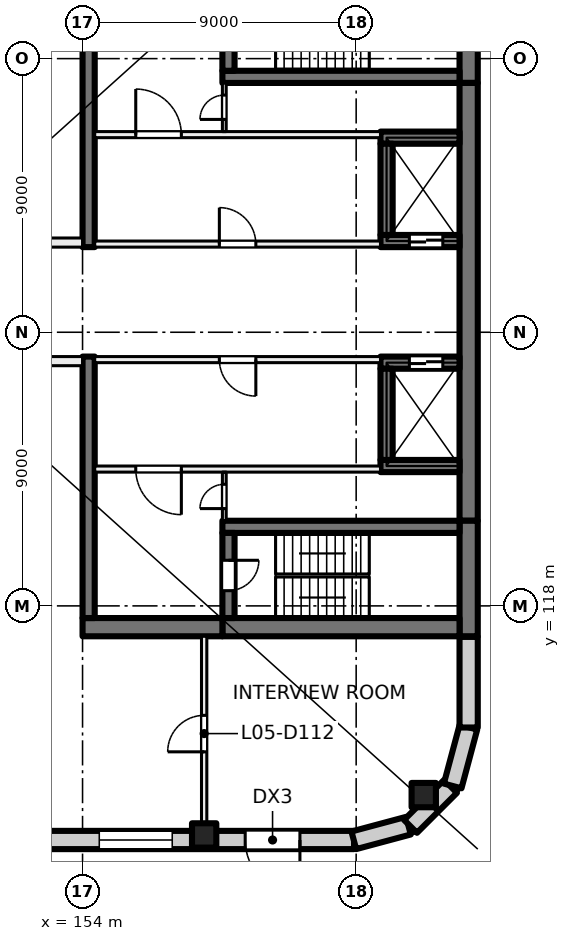
"""IFC4 building model, lengths in metres.
Left out: names, types, materials, properties, quantities, classifications, styles, units other than length and angle.
Written with IfcOpenShell. Run it as: python <this file> out.ifc"""

import sys

from ifc_helpers import new_model, si_unit, direction, frame, frame_2d, origin, origin_2d, place, context, subcontext, project, spatial, rectangle, extrude, element, fill, save


model = new_model("IFC4")
c1 = context("Model", 3, precision=1e-05, world=origin(), true_north=direction((0.0, 1.0)))
c2 = subcontext(c1, "Body", "Model", "MODEL_VIEW")
j1 = project(units=[si_unit("LENGTHUNIT", "METRE"), si_unit("PLANEANGLEUNIT", "RADIAN")], contexts=[c1])
p1 = place(None, origin())
s1 = spatial("IfcSite", under=j1, at=p1, CompositionType="ELEMENT")
p2 = place(p1, origin())
s2 = spatial("IfcBuilding", under=s1, at=p2, CompositionType="ELEMENT")
p3 = place(p2, frame((0.0, 0.0, 27.5)))
s3 = spatial("IfcBuildingStorey", under=s2, at=p3, CompositionType="ELEMENT", Elevation=27.5)
for number, where, z_axis, x_axis in (
    (1, (165.223, 111.777, 0.0), (0.0, 0.0, 1.0), (1.0, 0.0, 0.0)),
    (2, (158.0, 110.45, 0.0), (0.0, 0.0, 1.0), (1.0, 0.0, 0.0)),
):
    element("IfcColumn", number, at=place(p3, frame(where, z_axis=z_axis, x_axis=x_axis)), inside=s3, PredefinedType="COLUMN", context=c2, shape_type="SweptSolid", body=[
        extrude(rectangle(XDim=0.8, YDim=0.8, at=origin_2d()), origin(), (0.0, 0.0, 1.0), 4.0),
    ])
p4 = place(p3, frame((166.7, 139.0, 0.0), z_axis=(0.0, 0.0, 1.0), x_axis=(0.0, -1.0, 0.0)))
e3 = element("IfcWall", 3, at=p4, inside=s3, PredefinedType="SHEAR", context=c2, shape_type="SweptSolid", body=[
    extrude(rectangle(XDim=3.8, YDim=0.6, at=frame_2d((1.9, 0.0))), origin(), (0.0, 0.0, 1.0), 4.0),
])
p5 = place(p3, frame((166.7, 135.2, 0.0), z_axis=(0.0, 0.0, 1.0), x_axis=(0.0, -1.0, 0.0)))
e4 = element("IfcWall", 4, at=p5, inside=s3, PredefinedType="SHEAR", context=c2, shape_type="SweptSolid", body=[
    extrude(rectangle(XDim=14.4, YDim=0.6, at=frame_2d((7.2, 0.0))), origin(), (0.0, 0.0, 1.0), 4.0),
])
p6 = place(p3, frame((166.7, 120.8, 0.0), z_axis=(0.0, 0.0, 1.0), x_axis=(0.0, -1.0, 0.0)))
e5 = element("IfcWall", 5, at=p6, inside=s3, PredefinedType="SHEAR", context=c2, shape_type="SweptSolid", body=[
    extrude(rectangle(XDim=3.8, YDim=0.6, at=frame_2d((1.9, 0.0))), origin(), (0.0, 0.0, 1.0), 4.0),
])
p7 = place(p3, frame((166.4, 117.3, 0.0), z_axis=(0.0, 0.0, 1.0), x_axis=(-1.0, 0.0, 0.0)))
e6 = element("IfcWall", 6, at=p7, inside=s3, PredefinedType="SHEAR", context=c2, shape_type="SweptSolid", body=[
    extrude(rectangle(XDim=7.8, YDim=0.6, at=frame_2d((3.9, 0.0))), origin(), (0.0, 0.0, 1.0), 4.0),
])
p8 = place(p3, frame((158.6, 117.3, 0.0), z_axis=(0.0, 0.0, 1.0), x_axis=(-1.0, 0.0, 0.0)))
e7 = element("IfcWall", 7, at=p8, inside=s3, PredefinedType="SHEAR", context=c2, shape_type="SweptSolid", body=[
    extrude(rectangle(XDim=4.6, YDim=0.6, at=frame_2d((2.3, 0.0))), origin(), (0.0, 0.0, 1.0), 4.0),
])
p9 = place(p3, frame((166.4, 135.4, 0.0), z_axis=(0.0, 0.0, 1.0), x_axis=(-1.0, 0.0, 0.0)))
e8 = element("IfcWall", 8, at=p9, inside=s3, PredefinedType="SHEAR", context=c2, shape_type="SweptSolid", body=[
    extrude(rectangle(XDim=7.8, YDim=0.4, at=frame_2d((3.9, 0.0))), origin(), (0.0, 0.0, 1.0), 4.0),
])
p10 = place(p3, frame((158.8, 138.4, 0.0), z_axis=(0.0, 0.0, 1.0), x_axis=(0.0, -1.0, 0.0)))
e9 = element("IfcWall", 9, at=p10, inside=s3, PredefinedType="SHEAR", context=c2, shape_type="SweptSolid", body=[
    extrude(rectangle(XDim=2.8, YDim=0.4, at=frame_2d((1.4, 0.0))), origin(), (0.0, 0.0, 1.0), 4.0),
])
p11 = place(p10, frame((0.9, 0.0, 0.0)))
e10 = element("IfcOpeningElement", 10, at=p11, cuts=e9, PredefinedType="OPENING", context=c2, shape_type="SweptSolid", body=[
    extrude(rectangle(XDim=1.0, YDim=2.1, at=frame_2d((0.5, 1.05))), frame((0.0, 0.21, 0.0), z_axis=(0.0, -1.0, 0.0), x_axis=(1.0, 0.0, 0.0)), (0.0, 0.0, 1.0), 0.42),
])
p12 = place(p3, frame((166.4, 120.6, 0.0), z_axis=(0.0, 0.0, 1.0), x_axis=(-1.0, 0.0, 0.0)))
e11 = element("IfcWall", 11, at=p12, inside=s3, PredefinedType="SHEAR", context=c2, shape_type="SweptSolid", body=[
    extrude(rectangle(XDim=7.8, YDim=0.4, at=frame_2d((3.9, 0.0))), origin(), (0.0, 0.0, 1.0), 4.0),
])
p13 = place(p3, frame((158.8, 120.4, 0.0), z_axis=(0.0, 0.0, 1.0), x_axis=(0.0, -1.0, 0.0)))
e12 = element("IfcWall", 12, at=p13, inside=s3, PredefinedType="SHEAR", context=c2, shape_type="SweptSolid", body=[
    extrude(rectangle(XDim=2.8, YDim=0.4, at=frame_2d((1.4, 0.0))), origin(), (0.0, 0.0, 1.0), 4.0),
])
p14 = place(p13, frame((0.9, 0.0, 0.0)))
e13 = element("IfcOpeningElement", 13, at=p14, cuts=e12, PredefinedType="OPENING", context=c2, shape_type="SweptSolid", body=[
    extrude(rectangle(XDim=1.0, YDim=2.1, at=frame_2d((0.5, 1.05))), frame((0.0, 0.21, 0.0), z_axis=(0.0, -1.0, 0.0), x_axis=(1.0, 0.0, 0.0)), (0.0, 0.0, 1.0), 0.42),
])
p15 = place(p3, frame((166.4, 130.0, 0.0), z_axis=(0.0, 0.0, 1.0), x_axis=(-1.0, 0.0, 0.0)))
e14 = element("IfcWall", 14, at=p15, inside=s3, PredefinedType="SHEAR", context=c2, shape_type="SweptSolid", body=[
    extrude(rectangle(XDim=2.6, YDim=0.4, at=frame_2d((1.3, 0.0))), origin(), (0.0, 0.0, 1.0), 4.0),
])
p16 = place(p15, frame((0.55, 0.0, 0.0)))
e15 = element("IfcOpeningElement", 15, at=p16, cuts=e14, PredefinedType="OPENING", context=c2, shape_type="SweptSolid", body=[
    extrude(rectangle(XDim=1.1, YDim=2.1, at=frame_2d((0.55, 1.05))), frame((0.0, 0.21, 0.0), z_axis=(0.0, -1.0, 0.0), x_axis=(1.0, 0.0, 0.0)), (0.0, 0.0, 1.0), 0.42),
])
p17 = place(p3, frame((166.4, 133.4, 0.0), z_axis=(0.0, 0.0, 1.0), x_axis=(-1.0, 0.0, 0.0)))
e16 = element("IfcWall", 16, at=p17, inside=s3, PredefinedType="SHEAR", context=c2, shape_type="SweptSolid", body=[
    extrude(rectangle(XDim=2.6, YDim=0.4, at=frame_2d((1.3, 0.0))), origin(), (0.0, 0.0, 1.0), 4.0),
])
p18 = place(p3, frame((164.0, 133.2, 0.0), z_axis=(0.0, 0.0, 1.0), x_axis=(0.0, -1.0, 0.0)))
e17 = element("IfcWall", 17, at=p18, inside=s3, PredefinedType="SHEAR", context=c2, shape_type="SweptSolid", body=[
    extrude(rectangle(XDim=3.0, YDim=0.4, at=frame_2d((1.5, 0.0))), origin(), (0.0, 0.0, 1.0), 4.0),
])
p19 = place(p3, frame((166.4, 126.0, 0.0), z_axis=(0.0, 0.0, 1.0), x_axis=(-1.0, 0.0, 0.0)))
e18 = element("IfcWall", 18, at=p19, inside=s3, PredefinedType="SHEAR", context=c2, shape_type="SweptSolid", body=[
    extrude(rectangle(XDim=2.6, YDim=0.4, at=frame_2d((1.3, 0.0))), origin(), (0.0, 0.0, 1.0), 4.0),
])
p20 = place(p19, frame((0.55, 0.0, 0.0)))
e19 = element("IfcOpeningElement", 19, at=p20, cuts=e18, PredefinedType="OPENING", context=c2, shape_type="SweptSolid", body=[
    extrude(rectangle(XDim=1.1, YDim=2.1, at=frame_2d((0.55, 1.05))), frame((0.0, 0.21, 0.0), z_axis=(0.0, -1.0, 0.0), x_axis=(1.0, 0.0, 0.0)), (0.0, 0.0, 1.0), 0.42),
])
p21 = place(p3, frame((166.4, 122.6, 0.0), z_axis=(0.0, 0.0, 1.0), x_axis=(-1.0, 0.0, 0.0)))
e20 = element("IfcWall", 20, at=p21, inside=s3, PredefinedType="SHEAR", context=c2, shape_type="SweptSolid", body=[
    extrude(rectangle(XDim=2.6, YDim=0.4, at=frame_2d((1.3, 0.0))), origin(), (0.0, 0.0, 1.0), 4.0),
])
p22 = place(p3, frame((164.0, 125.8, 0.0), z_axis=(0.0, 0.0, 1.0), x_axis=(0.0, -1.0, 0.0)))
e21 = element("IfcWall", 21, at=p22, inside=s3, PredefinedType="SHEAR", context=c2, shape_type="SweptSolid", body=[
    extrude(rectangle(XDim=3.0, YDim=0.4, at=frame_2d((1.5, 0.0))), origin(), (0.0, 0.0, 1.0), 4.0),
])
for number, where, z_axis, x_axis in (
    (22, (154.2, 138.4, 0.0), (0.0, 0.0, 1.0), (0.0, -1.0, 0.0)),
    (23, (154.2, 126.2, 0.0), (0.0, 0.0, 1.0), (0.0, -1.0, 0.0)),
):
    element("IfcWall", number, at=place(p3, frame(where, z_axis=z_axis, x_axis=x_axis)), inside=s3, PredefinedType="SHEAR", context=c2, shape_type="SweptSolid", body=[
        extrude(rectangle(XDim=8.6, YDim=0.4, at=frame_2d((4.3, 0.0))), origin(), (0.0, 0.0, 1.0), 4.0),
    ])
p23 = place(p3, frame((162.93, 110.3, 0.0), z_axis=(0.0, 0.0, 1.0), x_axis=(-1.0, 0.0, 0.0)))
e24 = element("IfcWall", 24, at=p23, inside=s3, PredefinedType="SOLIDWALL", context=c2, shape_type="SweptSolid", body=[
    extrude(rectangle(XDim=31.93, YDim=0.6, at=frame_2d((15.965, 0.0))), origin(), (0.0, 0.0, 1.0), 3.625),
])
p24 = place(p23, frame((1.78, 0.0, 0.0)))
e25 = element("IfcOpeningElement", 25, at=p24, cuts=e24, PredefinedType="OPENING", context=c2, shape_type="SweptSolid", body=[
    extrude(rectangle(XDim=1.8, YDim=2.4, at=frame_2d((0.9, 1.2))), frame((0.0, 0.31, 0.0), z_axis=(0.0, -1.0, 0.0), x_axis=(1.0, 0.0, 0.0)), (0.0, 0.0, 1.0), 0.62),
])
p25 = place(p23, frame((5.98, 0.0, 0.9)))
e26 = element("IfcOpeningElement", 26, at=p25, cuts=e24, PredefinedType="OPENING", context=c2, shape_type="SweptSolid", body=[
    extrude(rectangle(XDim=2.4, YDim=2.4, at=frame_2d((1.2, 1.2))), frame((0.0, 0.31, 0.0), z_axis=(0.0, -1.0, 0.0), x_axis=(1.0, 0.0, 0.0)), (0.0, 0.0, 1.0), 0.62),
])
p26 = place(p23, frame((10.48, 0.0, 0.9)))
e27 = element("IfcOpeningElement", 27, at=p26, cuts=e24, PredefinedType="OPENING", context=c2, shape_type="SweptSolid", body=[
    extrude(rectangle(XDim=2.4, YDim=2.4, at=frame_2d((1.2, 1.2))), frame((0.0, 0.31, 0.0), z_axis=(0.0, -1.0, 0.0), x_axis=(1.0, 0.0, 0.0)), (0.0, 0.0, 1.0), 0.62),
])
p27 = place(p23, frame((14.98, 0.0, 0.9)))
e28 = element("IfcOpeningElement", 28, at=p27, cuts=e24, PredefinedType="OPENING", context=c2, shape_type="SweptSolid", body=[
    extrude(rectangle(XDim=2.4, YDim=2.4, at=frame_2d((1.2, 1.2))), frame((0.0, 0.31, 0.0), z_axis=(0.0, -1.0, 0.0), x_axis=(1.0, 0.0, 0.0)), (0.0, 0.0, 1.0), 0.62),
])
p28 = place(p23, frame((19.78, 0.0, 0.0)))
e29 = element("IfcOpeningElement", 29, at=p28, cuts=e24, PredefinedType="OPENING", context=c2, shape_type="SweptSolid", body=[
    extrude(rectangle(XDim=1.8, YDim=2.4, at=frame_2d((0.9, 1.2))), frame((0.0, 0.31, 0.0), z_axis=(0.0, -1.0, 0.0), x_axis=(1.0, 0.0, 0.0)), (0.0, 0.0, 1.0), 0.62),
])
p29 = place(p23, frame((23.98, 0.0, 0.9)))
e30 = element("IfcOpeningElement", 30, at=p29, cuts=e24, PredefinedType="OPENING", context=c2, shape_type="SweptSolid", body=[
    extrude(rectangle(XDim=2.4, YDim=2.4, at=frame_2d((1.2, 1.2))), frame((0.0, 0.31, 0.0), z_axis=(0.0, -1.0, 0.0), x_axis=(1.0, 0.0, 0.0)), (0.0, 0.0, 1.0), 0.62),
])
p30 = place(p23, frame((28.48, 0.0, 0.9)))
e31 = element("IfcOpeningElement", 31, at=p30, cuts=e24, PredefinedType="OPENING", context=c2, shape_type="SweptSolid", body=[
    extrude(rectangle(XDim=2.4, YDim=2.4, at=frame_2d((1.2, 1.2))), frame((0.0, 0.31, 0.0), z_axis=(0.0, -1.0, 0.0), x_axis=(1.0, 0.0, 0.0)), (0.0, 0.0, 1.0), 0.62),
])
for number, where, z_axis, x_axis in (
    (32, (164.719, 110.771, 0.0), (0.0, 0.0, 1.0), (-0.966, -0.259, 0.0)),
    (33, (166.104, 112.064, 0.0), (0.0, 0.0, 1.0), (-0.707, -0.707, 0.0)),
):
    element("IfcWall", number, at=place(p3, frame(where, z_axis=z_axis, x_axis=x_axis)), inside=s3, PredefinedType="SOLIDWALL", context=c2, shape_type="SweptSolid", body=[
        extrude(rectangle(XDim=1.861, YDim=0.6, at=frame_2d((0.93, 0.0))), origin(), (0.0, 0.0, 1.0), 3.625),
    ])
p31 = place(p3, frame((166.692, 114.01, 0.0), z_axis=(0.0, 0.0, 1.0), x_axis=(-0.258839784042, -0.965920269068, 0.0)))
e34 = element("IfcWall", 34, at=p31, inside=s3, PredefinedType="SOLIDWALL", context=c2, shape_type="SweptSolid", body=[
    extrude(rectangle(XDim=2.0, YDim=0.6, at=frame_2d((1.0, 0.0))), origin(), (0.0, 0.0, 1.0), 3.625),
])
p32 = place(p3, frame((166.7, 116.98, 0.0), z_axis=(0.0, 0.0, 1.0), x_axis=(0.0, -1.0, 0.0)))
e35 = element("IfcWall", 35, at=p32, inside=s3, PredefinedType="SOLIDWALL", context=c2, shape_type="SweptSolid", body=[
    extrude(rectangle(XDim=2.98, YDim=0.6, at=frame_2d((1.49, 0.0))), origin(), (0.0, 0.0, 1.0), 3.625),
])
p33 = place(p3, frame((163.8, 126.1, 0.0), z_axis=(0.0, 0.0, 1.0), x_axis=(-1.0, 0.0, 0.0)))
e36 = element("IfcWall", 36, at=p33, inside=s3, PredefinedType="PARTITIONING", context=c2, shape_type="SweptSolid", body=[
    extrude(rectangle(XDim=9.4, YDim=0.2, at=frame_2d((4.7, 0.0))), origin(), (0.0, 0.0, 1.0), 3.625),
])
p34 = place(p33, frame((4.1, 0.0, 0.0)))
e37 = element("IfcOpeningElement", 37, at=p34, cuts=e36, PredefinedType="OPENING", context=c2, shape_type="SweptSolid", body=[
    extrude(rectangle(XDim=1.2, YDim=2.1, at=frame_2d((0.6, 1.05))), frame((0.0, 0.11, 0.0), z_axis=(0.0, -1.0, 0.0), x_axis=(1.0, 0.0, 0.0)), (0.0, 0.0, 1.0), 0.22),
])
p35 = place(p3, frame((163.8, 122.5, 0.0), z_axis=(0.0, 0.0, 1.0), x_axis=(-1.0, 0.0, 0.0)))
e38 = element("IfcWall", 38, at=p35, inside=s3, PredefinedType="PARTITIONING", context=c2, shape_type="SweptSolid", body=[
    extrude(rectangle(XDim=9.4, YDim=0.2, at=frame_2d((4.7, 0.0))), origin(), (0.0, 0.0, 1.0), 3.625),
])
p36 = place(p35, frame((6.55, 0.0, 0.0)))
e39 = element("IfcOpeningElement", 39, at=p36, cuts=e38, PredefinedType="OPENING", context=c2, shape_type="SweptSolid", body=[
    extrude(rectangle(XDim=1.5, YDim=2.1, at=frame_2d((0.75, 1.05))), frame((0.0, 0.11, 0.0), z_axis=(0.0, -1.0, 0.0), x_axis=(1.0, 0.0, 0.0)), (0.0, 0.0, 1.0), 0.22),
])
p37 = place(p3, frame((158.663, 120.8, 0.0), z_axis=(0.0, 0.0, 1.0), x_axis=(0.0, 1.0, 0.0)))
e40 = element("IfcWall", 40, at=p37, inside=s3, PredefinedType="PARTITIONING", context=c2, shape_type="SweptSolid", body=[
    extrude(rectangle(XDim=1.6, YDim=0.125, at=frame_2d((0.8, 0.0))), origin(), (0.0, 0.0, 1.0), 3.625),
])
p38 = place(p37, frame((0.4, 0.0, 0.0)))
e41 = element("IfcOpeningElement", 41, at=p38, cuts=e40, PredefinedType="OPENING", context=c2, shape_type="SweptSolid", body=[
    extrude(rectangle(XDim=0.8, YDim=2.1, at=frame_2d((0.4, 1.05))), frame((0.0, 0.073, 0.0), z_axis=(0.0, -1.0, 0.0), x_axis=(1.0, 0.0, 0.0)), (0.0, 0.0, 1.0), 0.145),
])
p39 = place(p3, frame((154.4, 129.9, 0.0), z_axis=(0.0, 0.0, 1.0), x_axis=(1.0, 0.0, 0.0)))
e42 = element("IfcWall", 42, at=p39, inside=s3, PredefinedType="PARTITIONING", context=c2, shape_type="SweptSolid", body=[
    extrude(rectangle(XDim=9.4, YDim=0.2, at=frame_2d((4.7, 0.0))), origin(), (0.0, 0.0, 1.0), 3.625),
])
p40 = place(p39, frame((4.1, 0.0, 0.0)))
e43 = element("IfcOpeningElement", 43, at=p40, cuts=e42, PredefinedType="OPENING", context=c2, shape_type="SweptSolid", body=[
    extrude(rectangle(XDim=1.2, YDim=2.1, at=frame_2d((0.6, 1.05))), frame((0.0, 0.11, 0.0), z_axis=(0.0, -1.0, 0.0), x_axis=(1.0, 0.0, 0.0)), (0.0, 0.0, 1.0), 0.22),
])
p41 = place(p3, frame((154.4, 133.5, 0.0), z_axis=(0.0, 0.0, 1.0), x_axis=(1.0, 0.0, 0.0)))
e44 = element("IfcWall", 44, at=p41, inside=s3, PredefinedType="PARTITIONING", context=c2, shape_type="SweptSolid", body=[
    extrude(rectangle(XDim=9.4, YDim=0.2, at=frame_2d((4.7, 0.0))), origin(), (0.0, 0.0, 1.0), 3.625),
])
p42 = place(p41, frame((1.35, 0.0, 0.0)))
e45 = element("IfcOpeningElement", 45, at=p42, cuts=e44, PredefinedType="OPENING", context=c2, shape_type="SweptSolid", body=[
    extrude(rectangle(XDim=1.5, YDim=2.1, at=frame_2d((0.75, 1.05))), frame((0.0, 0.11, 0.0), z_axis=(0.0, -1.0, 0.0), x_axis=(1.0, 0.0, 0.0)), (0.0, 0.0, 1.0), 0.22),
])
p43 = place(p3, frame((158.663, 133.6, 0.0), z_axis=(0.0, 0.0, 1.0), x_axis=(0.0, 1.0, 0.0)))
e46 = element("IfcWall", 46, at=p43, inside=s3, PredefinedType="PARTITIONING", context=c2, shape_type="SweptSolid", body=[
    extrude(rectangle(XDim=1.6, YDim=0.125, at=frame_2d((0.8, 0.0))), origin(), (0.0, 0.0, 1.0), 3.625),
])
p44 = place(p43, frame((0.4, 0.0, 0.0)))
e47 = element("IfcOpeningElement", 47, at=p44, cuts=e46, PredefinedType="OPENING", context=c2, shape_type="SweptSolid", body=[
    extrude(rectangle(XDim=0.8, YDim=2.1, at=frame_2d((0.4, 1.05))), frame((0.0, 0.073, 0.0), z_axis=(0.0, -1.0, 0.0), x_axis=(1.0, 0.0, 0.0)), (0.0, 0.0, 1.0), 0.145),
])
p45 = place(p3, frame((140.0, 129.95, 0.0), z_axis=(0.0, 0.0, 1.0), x_axis=(1.0, 0.0, 0.0)))
e48 = element("IfcWall", 48, at=p45, inside=s3, PredefinedType="PARTITIONING", context=c2, shape_type="SweptSolid", body=[
    extrude(rectangle(XDim=14.0, YDim=0.3, at=frame_2d((7.0, 0.0))), origin(), (0.0, 0.0, 1.0), 3.625),
])
p46 = place(p45, frame((2.75, 0.0, 0.0)))
e49 = element("IfcOpeningElement", 49, at=p46, cuts=e48, PredefinedType="OPENING", context=c2, shape_type="SweptSolid", body=[
    extrude(rectangle(XDim=1.0, YDim=2.1, at=frame_2d((0.5, 1.05))), frame((0.0, 0.16, 0.0), z_axis=(0.0, -1.0, 0.0), x_axis=(1.0, 0.0, 0.0)), (0.0, 0.0, 1.0), 0.32),
])
p47 = place(p45, frame((10.6, 0.0, 0.0)))
e50 = element("IfcOpeningElement", 50, at=p47, cuts=e48, PredefinedType="OPENING", context=c2, shape_type="SweptSolid", body=[
    extrude(rectangle(XDim=1.8, YDim=2.1, at=frame_2d((0.9, 1.05))), frame((0.0, 0.16, 0.0), z_axis=(0.0, -1.0, 0.0), x_axis=(1.0, 0.0, 0.0)), (0.0, 0.0, 1.0), 0.32),
])
p48 = place(p3, frame((154.0, 126.05, 0.0), z_axis=(0.0, 0.0, 1.0), x_axis=(-1.0, 0.0, 0.0)))
e51 = element("IfcWall", 51, at=p48, inside=s3, PredefinedType="PARTITIONING", context=c2, shape_type="SweptSolid", body=[
    extrude(rectangle(XDim=14.0, YDim=0.3, at=frame_2d((7.0, 0.0))), origin(), (0.0, 0.0, 1.0), 3.625),
])
p49 = place(p48, frame((6.1, 0.0, 0.0)))
e52 = element("IfcOpeningElement", 52, at=p49, cuts=e51, PredefinedType="OPENING", context=c2, shape_type="SweptSolid", body=[
    extrude(rectangle(XDim=1.8, YDim=2.1, at=frame_2d((0.9, 1.05))), frame((0.0, 0.16, 0.0), z_axis=(0.0, -1.0, 0.0), x_axis=(1.0, 0.0, 0.0)), (0.0, 0.0, 1.0), 0.32),
])
p50 = place(p3, frame((158.0, 110.6, 0.0), z_axis=(0.0, 0.0, 1.0), x_axis=(0.0, 1.0, 0.0)))
e53 = element("IfcWall", 53, at=p50, inside=s3, PredefinedType="PARTITIONING", context=c2, shape_type="SweptSolid", body=[
    extrude(rectangle(XDim=6.4, YDim=0.175, at=frame_2d((3.2, 0.0))), origin(), (0.0, 0.0, 1.0), 3.625),
])
p51 = place(p50, frame((2.6, 0.0, 0.0)))
e54 = element("IfcOpeningElement", 54, at=p51, cuts=e53, PredefinedType="OPENING", context=c2, shape_type="SweptSolid", body=[
    extrude(rectangle(XDim=1.2, YDim=2.1, at=frame_2d((0.6, 1.05))), frame((0.0, 0.097, 0.0), z_axis=(0.0, -1.0, 0.0), x_axis=(1.0, 0.0, 0.0)), (0.0, 0.0, 1.0), 0.195),
])
p52 = place(p24, origin())
e55 = element("IfcDoor", 55, at=p52, inside=s3, OperationType="DOUBLE_DOOR_SINGLE_SWING", PredefinedType="DOOR", context=c2, shape_type="SweptSolid", body=[
    extrude(rectangle(XDim=1.8, YDim=2.4, at=frame_2d((0.9, 1.2))), frame((0.0, 0.025, 0.0), z_axis=(0.0, -1.0, 0.0), x_axis=(1.0, 0.0, 0.0)), (0.0, 0.0, 1.0), 0.05),
])
fill(e25, e55)
p53 = place(p25, origin())
e56 = element("IfcWindow", 56, at=p53, inside=s3, PartitioningType="SINGLE_PANEL", PredefinedType="WINDOW", context=c2, shape_type="SweptSolid", body=[
    extrude(rectangle(XDim=2.4, YDim=2.4, at=frame_2d((1.2, 1.2))), frame((0.0, 0.03, 0.0), z_axis=(0.0, -1.0, 0.0), x_axis=(1.0, 0.0, 0.0)), (0.0, 0.0, 1.0), 0.06),
])
fill(e26, e56)
p54 = place(p20, origin())
e57 = element("IfcDoor", 57, at=p54, inside=s3, OperationType="DOUBLE_DOOR_SLIDING", PredefinedType="DOOR", context=c2, shape_type="SweptSolid", body=[
    extrude(rectangle(XDim=1.1, YDim=2.1, at=frame_2d((0.55, 1.05))), frame((0.0, 0.025, 0.0), z_axis=(0.0, -1.0, 0.0), x_axis=(1.0, 0.0, 0.0)), (0.0, 0.0, 1.0), 0.05),
])
fill(e19, e57)
p55 = place(p16, origin())
e58 = element("IfcDoor", 58, at=p55, inside=s3, OperationType="DOUBLE_DOOR_SLIDING", PredefinedType="DOOR", context=c2, shape_type="SweptSolid", body=[
    extrude(rectangle(XDim=1.1, YDim=2.1, at=frame_2d((0.55, 1.05))), frame((0.0, 0.025, 0.0), z_axis=(0.0, -1.0, 0.0), x_axis=(1.0, 0.0, 0.0)), (0.0, 0.0, 1.0), 0.05),
])
fill(e15, e58)
p56 = place(p34, origin())
e59 = element("IfcDoor", 59, at=p56, inside=s3, OperationType="DOUBLE_DOOR_SINGLE_SWING", PredefinedType="DOOR", context=c2, shape_type="SweptSolid", body=[
    extrude(rectangle(XDim=1.2, YDim=2.1, at=frame_2d((0.6, 1.05))), frame((0.0, 0.025, 0.0), z_axis=(0.0, -1.0, 0.0), x_axis=(1.0, 0.0, 0.0)), (0.0, 0.0, 1.0), 0.05),
])
fill(e37, e59)
p57 = place(p36, origin())
e60 = element("IfcDoor", 60, at=p57, inside=s3, OperationType="DOUBLE_DOOR_SINGLE_SWING", PredefinedType="DOOR", context=c2, shape_type="SweptSolid", body=[
    extrude(rectangle(XDim=1.5, YDim=2.1, at=frame_2d((0.75, 1.05))), frame((0.0, 0.025, 0.0), z_axis=(0.0, -1.0, 0.0), x_axis=(1.0, 0.0, 0.0)), (0.0, 0.0, 1.0), 0.05),
])
fill(e39, e60)
p58 = place(p14, origin())
e61 = element("IfcDoor", 61, at=p58, inside=s3, OperationType="SINGLE_SWING_LEFT", PredefinedType="DOOR", context=c2, shape_type="SweptSolid", body=[
    extrude(rectangle(XDim=1.0, YDim=2.1, at=frame_2d((0.5, 1.05))), frame((0.0, 0.025, 0.0), z_axis=(0.0, -1.0, 0.0), x_axis=(1.0, 0.0, 0.0)), (0.0, 0.0, 1.0), 0.05),
])
fill(e13, e61)
p59 = place(p38, origin())
e62 = element("IfcDoor", 62, at=p59, inside=s3, OperationType="SINGLE_SWING_RIGHT", PredefinedType="DOOR", context=c2, shape_type="SweptSolid", body=[
    extrude(rectangle(XDim=0.8, YDim=2.1, at=frame_2d((0.4, 1.05))), frame((0.0, 0.025, 0.0), z_axis=(0.0, -1.0, 0.0), x_axis=(1.0, 0.0, 0.0)), (0.0, 0.0, 1.0), 0.05),
])
fill(e41, e62)
p60 = place(p40, origin())
e63 = element("IfcDoor", 63, at=p60, inside=s3, OperationType="DOUBLE_DOOR_SINGLE_SWING", PredefinedType="DOOR", context=c2, shape_type="SweptSolid", body=[
    extrude(rectangle(XDim=1.2, YDim=2.1, at=frame_2d((0.6, 1.05))), frame((0.0, 0.025, 0.0), z_axis=(0.0, -1.0, 0.0), x_axis=(1.0, 0.0, 0.0)), (0.0, 0.0, 1.0), 0.05),
])
fill(e43, e63)
p61 = place(p42, origin())
e64 = element("IfcDoor", 64, at=p61, inside=s3, OperationType="DOUBLE_DOOR_SINGLE_SWING", PredefinedType="DOOR", context=c2, shape_type="SweptSolid", body=[
    extrude(rectangle(XDim=1.5, YDim=2.1, at=frame_2d((0.75, 1.05))), frame((0.0, 0.025, 0.0), z_axis=(0.0, -1.0, 0.0), x_axis=(1.0, 0.0, 0.0)), (0.0, 0.0, 1.0), 0.05),
])
fill(e45, e64)
p62 = place(p44, origin())
e65 = element("IfcDoor", 65, at=p62, inside=s3, OperationType="SINGLE_SWING_LEFT", PredefinedType="DOOR", context=c2, shape_type="SweptSolid", body=[
    extrude(rectangle(XDim=0.8, YDim=2.1, at=frame_2d((0.4, 1.05))), frame((0.0, 0.025, 0.0), z_axis=(0.0, -1.0, 0.0), x_axis=(1.0, 0.0, 0.0)), (0.0, 0.0, 1.0), 0.05),
])
fill(e47, e65)
p63 = place(p51, origin())
e66 = element("IfcDoor", 66, at=p63, inside=s3, OperationType="DOUBLE_DOOR_SINGLE_SWING", PredefinedType="DOOR", context=c2, shape_type="SweptSolid", body=[
    extrude(rectangle(XDim=1.2, YDim=2.1, at=frame_2d((0.6, 1.05))), frame((0.0, 0.025, 0.0), z_axis=(0.0, -1.0, 0.0), x_axis=(1.0, 0.0, 0.0)), (0.0, 0.0, 1.0), 0.05),
])
fill(e54, e66)
save(model, sys.argv[1])
